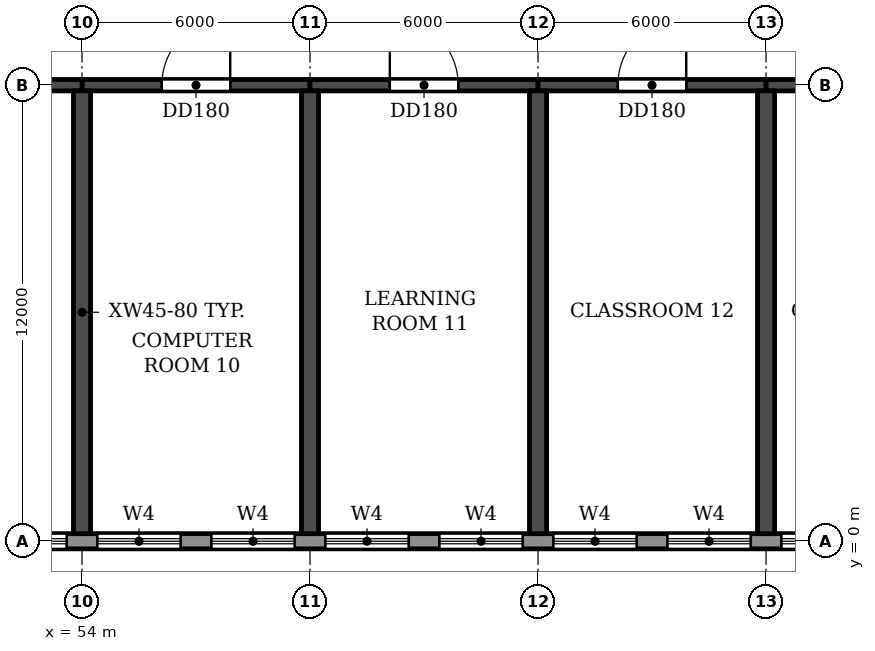
"""IFC4 building model, lengths in metres.
Left out: names, types, materials, properties, quantities, classifications, styles, units other than length and angle.
Written with IfcOpenShell. Run it as: python <this file> out.ifc"""

import sys

from ifc_helpers import new_model, si_unit, direction, frame, frame_2d, origin, place, context, subcontext, project, spatial, rectangle, extrude, element, fill, save


model = new_model("IFC4")
c1 = context("Model", 3, precision=1e-05, world=origin(), true_north=direction((0.0, 1.0)))
c2 = subcontext(c1, "Body", "Model", "MODEL_VIEW")
j1 = project(units=[si_unit("LENGTHUNIT", "METRE"), si_unit("PLANEANGLEUNIT", "RADIAN")], contexts=[c1])
p1 = place(None, origin())
s1 = spatial("IfcSite", under=j1, at=p1, CompositionType="ELEMENT")
p2 = place(p1, origin())
s2 = spatial("IfcBuilding", under=s1, at=p2, CompositionType="ELEMENT")
p3 = place(p2, frame((0.0, 0.0, 15.0)))
s3 = spatial("IfcBuildingStorey", under=s2, at=p3, CompositionType="ELEMENT", Elevation=15.0)
for number, where, z_axis, x_axis in (
    (1, (54.0, 0.2, 0.0), (0.0, 0.0, 1.0), (0.0, 1.0, 0.0)),
    (2, (60.0, 0.2, 0.0), (0.0, 0.0, 1.0), (0.0, 1.0, 0.0)),
    (3, (66.0, 0.2, 0.0), (0.0, 0.0, 1.0), (0.0, 1.0, 0.0)),
    (4, (72.0, 0.2, 0.0), (0.0, 0.0, 1.0), (0.0, 1.0, 0.0)),
):
    element("IfcWall", number, at=place(p3, frame(where, z_axis=z_axis, x_axis=x_axis)), inside=s3, PredefinedType="SHEAR", context=c2, shape_type="SweptSolid", body=[
        extrude(rectangle(XDim=11.65, YDim=0.45, at=frame_2d((5.825, 0.0))), origin(), (0.0, 0.0, 1.0), 3.92),
    ])
p4 = place(p3, frame((48.0, 12.0, 0.0), z_axis=(0.0, 0.0, 1.0), x_axis=(1.0, 0.0, 0.0)))
e5 = element("IfcWall", 5, at=p4, inside=s3, PredefinedType="SHEAR", context=c2, shape_type="SweptSolid", body=[
    extrude(rectangle(XDim=6.0, YDim=0.3, at=frame_2d((3.0, 0.0))), origin(), (0.0, 0.0, 1.0), 3.32),
])
p5 = place(p4, frame((2.1, 0.0, 0.0)))
e6 = element("IfcOpeningElement", 6, at=p5, cuts=e5, PredefinedType="OPENING", context=c2, shape_type="SweptSolid", body=[
    extrude(rectangle(XDim=1.8, YDim=2.1, at=frame_2d((0.9, 1.05))), frame((0.0, 0.16, 0.0), z_axis=(0.0, -1.0, 0.0), x_axis=(1.0, 0.0, 0.0)), (0.0, 0.0, 1.0), 0.32),
])
p6 = place(p3, frame((54.0, 12.0, 0.0), z_axis=(0.0, 0.0, 1.0), x_axis=(1.0, 0.0, 0.0)))
e7 = element("IfcWall", 7, at=p6, inside=s3, PredefinedType="SHEAR", context=c2, shape_type="SweptSolid", body=[
    extrude(rectangle(XDim=6.0, YDim=0.3, at=frame_2d((3.0, 0.0))), origin(), (0.0, 0.0, 1.0), 3.32),
])
p7 = place(p6, frame((2.1, 0.0, 0.0)))
e8 = element("IfcOpeningElement", 8, at=p7, cuts=e7, PredefinedType="OPENING", context=c2, shape_type="SweptSolid", body=[
    extrude(rectangle(XDim=1.8, YDim=2.1, at=frame_2d((0.9, 1.05))), frame((0.0, 0.16, 0.0), z_axis=(0.0, -1.0, 0.0), x_axis=(1.0, 0.0, 0.0)), (0.0, 0.0, 1.0), 0.32),
])
p8 = place(p3, frame((60.0, 12.0, 0.0), z_axis=(0.0, 0.0, 1.0), x_axis=(1.0, 0.0, 0.0)))
e9 = element("IfcWall", 9, at=p8, inside=s3, PredefinedType="SHEAR", context=c2, shape_type="SweptSolid", body=[
    extrude(rectangle(XDim=6.0, YDim=0.3, at=frame_2d((3.0, 0.0))), origin(), (0.0, 0.0, 1.0), 3.32),
])
p9 = place(p8, frame((2.1, 0.0, 0.0)))
e10 = element("IfcOpeningElement", 10, at=p9, cuts=e9, PredefinedType="OPENING", context=c2, shape_type="SweptSolid", body=[
    extrude(rectangle(XDim=1.8, YDim=2.1, at=frame_2d((0.9, 1.05))), frame((0.0, 0.16, 0.0), z_axis=(0.0, -1.0, 0.0), x_axis=(1.0, 0.0, 0.0)), (0.0, 0.0, 1.0), 0.32),
])
p10 = place(p3, frame((66.0, 12.0, 0.0), z_axis=(0.0, 0.0, 1.0), x_axis=(1.0, 0.0, 0.0)))
e11 = element("IfcWall", 11, at=p10, inside=s3, PredefinedType="SHEAR", context=c2, shape_type="SweptSolid", body=[
    extrude(rectangle(XDim=6.0, YDim=0.3, at=frame_2d((3.0, 0.0))), origin(), (0.0, 0.0, 1.0), 3.32),
])
p11 = place(p10, frame((2.1, 0.0, 0.0)))
e12 = element("IfcOpeningElement", 12, at=p11, cuts=e11, PredefinedType="OPENING", context=c2, shape_type="SweptSolid", body=[
    extrude(rectangle(XDim=1.8, YDim=2.1, at=frame_2d((0.9, 1.05))), frame((0.0, 0.16, 0.0), z_axis=(0.0, -1.0, 0.0), x_axis=(1.0, 0.0, 0.0)), (0.0, 0.0, 1.0), 0.32),
])
p12 = place(p3, frame((72.0, 12.0, 0.0), z_axis=(0.0, 0.0, 1.0), x_axis=(1.0, 0.0, 0.0)))
e13 = element("IfcWall", 13, at=p12, inside=s3, PredefinedType="SHEAR", context=c2, shape_type="SweptSolid", body=[
    extrude(rectangle(XDim=6.0, YDim=0.3, at=frame_2d((3.0, 0.0))), origin(), (0.0, 0.0, 1.0), 3.32),
])
p13 = place(p12, frame((2.1, 0.0, 0.0)))
e14 = element("IfcOpeningElement", 14, at=p13, cuts=e13, PredefinedType="OPENING", context=c2, shape_type="SweptSolid", body=[
    extrude(rectangle(XDim=1.8, YDim=2.1, at=frame_2d((0.9, 1.05))), frame((0.0, 0.16, 0.0), z_axis=(0.0, -1.0, 0.0), x_axis=(1.0, 0.0, 0.0)), (0.0, 0.0, 1.0), 0.32),
])
p14 = place(p3, frame((-3.0, 0.0, 0.0), z_axis=(0.0, 0.0, 1.0), x_axis=(1.0, 0.0, 0.0)))
e15 = element("IfcWall", 15, at=p14, inside=s3, PredefinedType="STANDARD", context=c2, shape_type="SweptSolid", body=[
    extrude(rectangle(XDim=108.0, YDim=0.4, at=frame_2d((54.0, 0.0))), origin(), (0.0, 0.0, 1.0), 3.92),
])
p15 = place(p14, frame((3.4, 0.0, 0.9)))
e16 = element("IfcOpeningElement", 16, at=p15, cuts=e15, PredefinedType="OPENING", context=c2, shape_type="SweptSolid", body=[
    extrude(rectangle(XDim=2.2, YDim=2.7, at=frame_2d((1.1, 1.35))), frame((0.0, 0.21, 0.0), z_axis=(0.0, -1.0, 0.0), x_axis=(1.0, 0.0, 0.0)), (0.0, 0.0, 1.0), 0.42),
])
p16 = place(p14, frame((6.4, 0.0, 0.9)))
e17 = element("IfcOpeningElement", 17, at=p16, cuts=e15, PredefinedType="OPENING", context=c2, shape_type="SweptSolid", body=[
    extrude(rectangle(XDim=2.2, YDim=2.7, at=frame_2d((1.1, 1.35))), frame((0.0, 0.21, 0.0), z_axis=(0.0, -1.0, 0.0), x_axis=(1.0, 0.0, 0.0)), (0.0, 0.0, 1.0), 0.42),
])
p17 = place(p14, frame((9.4, 0.0, 0.9)))
e18 = element("IfcOpeningElement", 18, at=p17, cuts=e15, PredefinedType="OPENING", context=c2, shape_type="SweptSolid", body=[
    extrude(rectangle(XDim=2.2, YDim=2.7, at=frame_2d((1.1, 1.35))), frame((0.0, 0.21, 0.0), z_axis=(0.0, -1.0, 0.0), x_axis=(1.0, 0.0, 0.0)), (0.0, 0.0, 1.0), 0.42),
])
p18 = place(p14, frame((12.4, 0.0, 0.9)))
e19 = element("IfcOpeningElement", 19, at=p18, cuts=e15, PredefinedType="OPENING", context=c2, shape_type="SweptSolid", body=[
    extrude(rectangle(XDim=2.2, YDim=2.7, at=frame_2d((1.1, 1.35))), frame((0.0, 0.21, 0.0), z_axis=(0.0, -1.0, 0.0), x_axis=(1.0, 0.0, 0.0)), (0.0, 0.0, 1.0), 0.42),
])
p19 = place(p14, frame((15.4, 0.0, 0.9)))
e20 = element("IfcOpeningElement", 20, at=p19, cuts=e15, PredefinedType="OPENING", context=c2, shape_type="SweptSolid", body=[
    extrude(rectangle(XDim=2.2, YDim=2.7, at=frame_2d((1.1, 1.35))), frame((0.0, 0.21, 0.0), z_axis=(0.0, -1.0, 0.0), x_axis=(1.0, 0.0, 0.0)), (0.0, 0.0, 1.0), 0.42),
])
p20 = place(p14, frame((18.4, 0.0, 0.9)))
e21 = element("IfcOpeningElement", 21, at=p20, cuts=e15, PredefinedType="OPENING", context=c2, shape_type="SweptSolid", body=[
    extrude(rectangle(XDim=2.2, YDim=2.7, at=frame_2d((1.1, 1.35))), frame((0.0, 0.21, 0.0), z_axis=(0.0, -1.0, 0.0), x_axis=(1.0, 0.0, 0.0)), (0.0, 0.0, 1.0), 0.42),
])
p21 = place(p14, frame((21.4, 0.0, 0.9)))
e22 = element("IfcOpeningElement", 22, at=p21, cuts=e15, PredefinedType="OPENING", context=c2, shape_type="SweptSolid", body=[
    extrude(rectangle(XDim=2.2, YDim=2.7, at=frame_2d((1.1, 1.35))), frame((0.0, 0.21, 0.0), z_axis=(0.0, -1.0, 0.0), x_axis=(1.0, 0.0, 0.0)), (0.0, 0.0, 1.0), 0.42),
])
p22 = place(p14, frame((24.4, 0.0, 0.9)))
e23 = element("IfcOpeningElement", 23, at=p22, cuts=e15, PredefinedType="OPENING", context=c2, shape_type="SweptSolid", body=[
    extrude(rectangle(XDim=2.2, YDim=2.7, at=frame_2d((1.1, 1.35))), frame((0.0, 0.21, 0.0), z_axis=(0.0, -1.0, 0.0), x_axis=(1.0, 0.0, 0.0)), (0.0, 0.0, 1.0), 0.42),
])
p23 = place(p14, frame((27.4, 0.0, 0.9)))
e24 = element("IfcOpeningElement", 24, at=p23, cuts=e15, PredefinedType="OPENING", context=c2, shape_type="SweptSolid", body=[
    extrude(rectangle(XDim=2.2, YDim=2.7, at=frame_2d((1.1, 1.35))), frame((0.0, 0.21, 0.0), z_axis=(0.0, -1.0, 0.0), x_axis=(1.0, 0.0, 0.0)), (0.0, 0.0, 1.0), 0.42),
])
p24 = place(p14, frame((30.4, 0.0, 0.9)))
e25 = element("IfcOpeningElement", 25, at=p24, cuts=e15, PredefinedType="OPENING", context=c2, shape_type="SweptSolid", body=[
    extrude(rectangle(XDim=2.2, YDim=2.7, at=frame_2d((1.1, 1.35))), frame((0.0, 0.21, 0.0), z_axis=(0.0, -1.0, 0.0), x_axis=(1.0, 0.0, 0.0)), (0.0, 0.0, 1.0), 0.42),
])
p25 = place(p14, frame((33.4, 0.0, 0.9)))
e26 = element("IfcOpeningElement", 26, at=p25, cuts=e15, PredefinedType="OPENING", context=c2, shape_type="SweptSolid", body=[
    extrude(rectangle(XDim=2.2, YDim=2.7, at=frame_2d((1.1, 1.35))), frame((0.0, 0.21, 0.0), z_axis=(0.0, -1.0, 0.0), x_axis=(1.0, 0.0, 0.0)), (0.0, 0.0, 1.0), 0.42),
])
p26 = place(p14, frame((36.4, 0.0, 0.9)))
e27 = element("IfcOpeningElement", 27, at=p26, cuts=e15, PredefinedType="OPENING", context=c2, shape_type="SweptSolid", body=[
    extrude(rectangle(XDim=2.2, YDim=2.7, at=frame_2d((1.1, 1.35))), frame((0.0, 0.21, 0.0), z_axis=(0.0, -1.0, 0.0), x_axis=(1.0, 0.0, 0.0)), (0.0, 0.0, 1.0), 0.42),
])
p27 = place(p14, frame((39.4, 0.0, 0.9)))
e28 = element("IfcOpeningElement", 28, at=p27, cuts=e15, PredefinedType="OPENING", context=c2, shape_type="SweptSolid", body=[
    extrude(rectangle(XDim=2.2, YDim=2.7, at=frame_2d((1.1, 1.35))), frame((0.0, 0.21, 0.0), z_axis=(0.0, -1.0, 0.0), x_axis=(1.0, 0.0, 0.0)), (0.0, 0.0, 1.0), 0.42),
])
p28 = place(p14, frame((42.4, 0.0, 0.9)))
e29 = element("IfcOpeningElement", 29, at=p28, cuts=e15, PredefinedType="OPENING", context=c2, shape_type="SweptSolid", body=[
    extrude(rectangle(XDim=2.2, YDim=2.7, at=frame_2d((1.1, 1.35))), frame((0.0, 0.21, 0.0), z_axis=(0.0, -1.0, 0.0), x_axis=(1.0, 0.0, 0.0)), (0.0, 0.0, 1.0), 0.42),
])
p29 = place(p14, frame((45.4, 0.0, 0.9)))
e30 = element("IfcOpeningElement", 30, at=p29, cuts=e15, PredefinedType="OPENING", context=c2, shape_type="SweptSolid", body=[
    extrude(rectangle(XDim=2.2, YDim=2.7, at=frame_2d((1.1, 1.35))), frame((0.0, 0.21, 0.0), z_axis=(0.0, -1.0, 0.0), x_axis=(1.0, 0.0, 0.0)), (0.0, 0.0, 1.0), 0.42),
])
p30 = place(p14, frame((48.4, 0.0, 0.9)))
e31 = element("IfcOpeningElement", 31, at=p30, cuts=e15, PredefinedType="OPENING", context=c2, shape_type="SweptSolid", body=[
    extrude(rectangle(XDim=2.2, YDim=2.7, at=frame_2d((1.1, 1.35))), frame((0.0, 0.21, 0.0), z_axis=(0.0, -1.0, 0.0), x_axis=(1.0, 0.0, 0.0)), (0.0, 0.0, 1.0), 0.42),
])
p31 = place(p14, frame((51.4, 0.0, 0.9)))
e32 = element("IfcOpeningElement", 32, at=p31, cuts=e15, PredefinedType="OPENING", context=c2, shape_type="SweptSolid", body=[
    extrude(rectangle(XDim=2.2, YDim=2.7, at=frame_2d((1.1, 1.35))), frame((0.0, 0.21, 0.0), z_axis=(0.0, -1.0, 0.0), x_axis=(1.0, 0.0, 0.0)), (0.0, 0.0, 1.0), 0.42),
])
p32 = place(p14, frame((54.4, 0.0, 0.9)))
e33 = element("IfcOpeningElement", 33, at=p32, cuts=e15, PredefinedType="OPENING", context=c2, shape_type="SweptSolid", body=[
    extrude(rectangle(XDim=2.2, YDim=2.7, at=frame_2d((1.1, 1.35))), frame((0.0, 0.21, 0.0), z_axis=(0.0, -1.0, 0.0), x_axis=(1.0, 0.0, 0.0)), (0.0, 0.0, 1.0), 0.42),
])
p33 = place(p14, frame((57.4, 0.0, 0.9)))
e34 = element("IfcOpeningElement", 34, at=p33, cuts=e15, PredefinedType="OPENING", context=c2, shape_type="SweptSolid", body=[
    extrude(rectangle(XDim=2.2, YDim=2.7, at=frame_2d((1.1, 1.35))), frame((0.0, 0.21, 0.0), z_axis=(0.0, -1.0, 0.0), x_axis=(1.0, 0.0, 0.0)), (0.0, 0.0, 1.0), 0.42),
])
p34 = place(p14, frame((60.4, 0.0, 0.9)))
e35 = element("IfcOpeningElement", 35, at=p34, cuts=e15, PredefinedType="OPENING", context=c2, shape_type="SweptSolid", body=[
    extrude(rectangle(XDim=2.2, YDim=2.7, at=frame_2d((1.1, 1.35))), frame((0.0, 0.21, 0.0), z_axis=(0.0, -1.0, 0.0), x_axis=(1.0, 0.0, 0.0)), (0.0, 0.0, 1.0), 0.42),
])
p35 = place(p14, frame((63.4, 0.0, 0.9)))
e36 = element("IfcOpeningElement", 36, at=p35, cuts=e15, PredefinedType="OPENING", context=c2, shape_type="SweptSolid", body=[
    extrude(rectangle(XDim=2.2, YDim=2.7, at=frame_2d((1.1, 1.35))), frame((0.0, 0.21, 0.0), z_axis=(0.0, -1.0, 0.0), x_axis=(1.0, 0.0, 0.0)), (0.0, 0.0, 1.0), 0.42),
])
p36 = place(p14, frame((66.4, 0.0, 0.9)))
e37 = element("IfcOpeningElement", 37, at=p36, cuts=e15, PredefinedType="OPENING", context=c2, shape_type="SweptSolid", body=[
    extrude(rectangle(XDim=2.2, YDim=2.7, at=frame_2d((1.1, 1.35))), frame((0.0, 0.21, 0.0), z_axis=(0.0, -1.0, 0.0), x_axis=(1.0, 0.0, 0.0)), (0.0, 0.0, 1.0), 0.42),
])
p37 = place(p14, frame((69.4, 0.0, 0.9)))
e38 = element("IfcOpeningElement", 38, at=p37, cuts=e15, PredefinedType="OPENING", context=c2, shape_type="SweptSolid", body=[
    extrude(rectangle(XDim=2.2, YDim=2.7, at=frame_2d((1.1, 1.35))), frame((0.0, 0.21, 0.0), z_axis=(0.0, -1.0, 0.0), x_axis=(1.0, 0.0, 0.0)), (0.0, 0.0, 1.0), 0.42),
])
p38 = place(p14, frame((72.4, 0.0, 0.9)))
e39 = element("IfcOpeningElement", 39, at=p38, cuts=e15, PredefinedType="OPENING", context=c2, shape_type="SweptSolid", body=[
    extrude(rectangle(XDim=2.2, YDim=2.7, at=frame_2d((1.1, 1.35))), frame((0.0, 0.21, 0.0), z_axis=(0.0, -1.0, 0.0), x_axis=(1.0, 0.0, 0.0)), (0.0, 0.0, 1.0), 0.42),
])
p39 = place(p14, frame((75.4, 0.0, 0.9)))
e40 = element("IfcOpeningElement", 40, at=p39, cuts=e15, PredefinedType="OPENING", context=c2, shape_type="SweptSolid", body=[
    extrude(rectangle(XDim=2.2, YDim=2.7, at=frame_2d((1.1, 1.35))), frame((0.0, 0.21, 0.0), z_axis=(0.0, -1.0, 0.0), x_axis=(1.0, 0.0, 0.0)), (0.0, 0.0, 1.0), 0.42),
])
p40 = place(p14, frame((78.4, 0.0, 0.9)))
e41 = element("IfcOpeningElement", 41, at=p40, cuts=e15, PredefinedType="OPENING", context=c2, shape_type="SweptSolid", body=[
    extrude(rectangle(XDim=2.2, YDim=2.7, at=frame_2d((1.1, 1.35))), frame((0.0, 0.21, 0.0), z_axis=(0.0, -1.0, 0.0), x_axis=(1.0, 0.0, 0.0)), (0.0, 0.0, 1.0), 0.42),
])
p41 = place(p14, frame((81.4, 0.0, 0.9)))
e42 = element("IfcOpeningElement", 42, at=p41, cuts=e15, PredefinedType="OPENING", context=c2, shape_type="SweptSolid", body=[
    extrude(rectangle(XDim=2.2, YDim=2.7, at=frame_2d((1.1, 1.35))), frame((0.0, 0.21, 0.0), z_axis=(0.0, -1.0, 0.0), x_axis=(1.0, 0.0, 0.0)), (0.0, 0.0, 1.0), 0.42),
])
p42 = place(p14, frame((84.4, 0.0, 0.9)))
e43 = element("IfcOpeningElement", 43, at=p42, cuts=e15, PredefinedType="OPENING", context=c2, shape_type="SweptSolid", body=[
    extrude(rectangle(XDim=2.2, YDim=2.7, at=frame_2d((1.1, 1.35))), frame((0.0, 0.21, 0.0), z_axis=(0.0, -1.0, 0.0), x_axis=(1.0, 0.0, 0.0)), (0.0, 0.0, 1.0), 0.42),
])
p43 = place(p14, frame((87.4, 0.0, 0.9)))
e44 = element("IfcOpeningElement", 44, at=p43, cuts=e15, PredefinedType="OPENING", context=c2, shape_type="SweptSolid", body=[
    extrude(rectangle(XDim=2.2, YDim=2.7, at=frame_2d((1.1, 1.35))), frame((0.0, 0.21, 0.0), z_axis=(0.0, -1.0, 0.0), x_axis=(1.0, 0.0, 0.0)), (0.0, 0.0, 1.0), 0.42),
])
p44 = place(p14, frame((90.4, 0.0, 0.9)))
e45 = element("IfcOpeningElement", 45, at=p44, cuts=e15, PredefinedType="OPENING", context=c2, shape_type="SweptSolid", body=[
    extrude(rectangle(XDim=2.2, YDim=2.7, at=frame_2d((1.1, 1.35))), frame((0.0, 0.21, 0.0), z_axis=(0.0, -1.0, 0.0), x_axis=(1.0, 0.0, 0.0)), (0.0, 0.0, 1.0), 0.42),
])
p45 = place(p14, frame((93.4, 0.0, 0.9)))
e46 = element("IfcOpeningElement", 46, at=p45, cuts=e15, PredefinedType="OPENING", context=c2, shape_type="SweptSolid", body=[
    extrude(rectangle(XDim=2.2, YDim=2.7, at=frame_2d((1.1, 1.35))), frame((0.0, 0.21, 0.0), z_axis=(0.0, -1.0, 0.0), x_axis=(1.0, 0.0, 0.0)), (0.0, 0.0, 1.0), 0.42),
])
p46 = place(p14, frame((96.4, 0.0, 0.9)))
e47 = element("IfcOpeningElement", 47, at=p46, cuts=e15, PredefinedType="OPENING", context=c2, shape_type="SweptSolid", body=[
    extrude(rectangle(XDim=2.2, YDim=2.7, at=frame_2d((1.1, 1.35))), frame((0.0, 0.21, 0.0), z_axis=(0.0, -1.0, 0.0), x_axis=(1.0, 0.0, 0.0)), (0.0, 0.0, 1.0), 0.42),
])
p47 = place(p14, frame((99.4, 0.0, 0.9)))
e48 = element("IfcOpeningElement", 48, at=p47, cuts=e15, PredefinedType="OPENING", context=c2, shape_type="SweptSolid", body=[
    extrude(rectangle(XDim=2.2, YDim=2.7, at=frame_2d((1.1, 1.35))), frame((0.0, 0.21, 0.0), z_axis=(0.0, -1.0, 0.0), x_axis=(1.0, 0.0, 0.0)), (0.0, 0.0, 1.0), 0.42),
])
p48 = place(p14, frame((102.4, 0.0, 0.9)))
e49 = element("IfcOpeningElement", 49, at=p48, cuts=e15, PredefinedType="OPENING", context=c2, shape_type="SweptSolid", body=[
    extrude(rectangle(XDim=2.2, YDim=2.7, at=frame_2d((1.1, 1.35))), frame((0.0, 0.21, 0.0), z_axis=(0.0, -1.0, 0.0), x_axis=(1.0, 0.0, 0.0)), (0.0, 0.0, 1.0), 0.42),
])
p49 = place(p32, origin())
e50 = element("IfcWindow", 50, at=p49, inside=s3, PartitioningType="DOUBLE_PANEL_HORIZONTAL", PredefinedType="WINDOW", context=c2, shape_type="SweptSolid", body=[
    extrude(rectangle(XDim=2.2, YDim=2.7, at=frame_2d((1.1, 1.35))), frame((0.0, 0.03, 0.0), z_axis=(0.0, -1.0, 0.0), x_axis=(1.0, 0.0, 0.0)), (0.0, 0.0, 1.0), 0.06),
])
fill(e33, e50)
p50 = place(p33, origin())
e51 = element("IfcWindow", 51, at=p50, inside=s3, PartitioningType="DOUBLE_PANEL_HORIZONTAL", PredefinedType="WINDOW", context=c2, shape_type="SweptSolid", body=[
    extrude(rectangle(XDim=2.2, YDim=2.7, at=frame_2d((1.1, 1.35))), frame((0.0, 0.03, 0.0), z_axis=(0.0, -1.0, 0.0), x_axis=(1.0, 0.0, 0.0)), (0.0, 0.0, 1.0), 0.06),
])
fill(e34, e51)
p51 = place(p34, origin())
e52 = element("IfcWindow", 52, at=p51, inside=s3, PartitioningType="DOUBLE_PANEL_HORIZONTAL", PredefinedType="WINDOW", context=c2, shape_type="SweptSolid", body=[
    extrude(rectangle(XDim=2.2, YDim=2.7, at=frame_2d((1.1, 1.35))), frame((0.0, 0.03, 0.0), z_axis=(0.0, -1.0, 0.0), x_axis=(1.0, 0.0, 0.0)), (0.0, 0.0, 1.0), 0.06),
])
fill(e35, e52)
p52 = place(p35, origin())
e53 = element("IfcWindow", 53, at=p52, inside=s3, PartitioningType="DOUBLE_PANEL_HORIZONTAL", PredefinedType="WINDOW", context=c2, shape_type="SweptSolid", body=[
    extrude(rectangle(XDim=2.2, YDim=2.7, at=frame_2d((1.1, 1.35))), frame((0.0, 0.03, 0.0), z_axis=(0.0, -1.0, 0.0), x_axis=(1.0, 0.0, 0.0)), (0.0, 0.0, 1.0), 0.06),
])
fill(e36, e53)
p53 = place(p36, origin())
e54 = element("IfcWindow", 54, at=p53, inside=s3, PartitioningType="DOUBLE_PANEL_HORIZONTAL", PredefinedType="WINDOW", context=c2, shape_type="SweptSolid", body=[
    extrude(rectangle(XDim=2.2, YDim=2.7, at=frame_2d((1.1, 1.35))), frame((0.0, 0.03, 0.0), z_axis=(0.0, -1.0, 0.0), x_axis=(1.0, 0.0, 0.0)), (0.0, 0.0, 1.0), 0.06),
])
fill(e37, e54)
p54 = place(p37, origin())
e55 = element("IfcWindow", 55, at=p54, inside=s3, PartitioningType="DOUBLE_PANEL_HORIZONTAL", PredefinedType="WINDOW", context=c2, shape_type="SweptSolid", body=[
    extrude(rectangle(XDim=2.2, YDim=2.7, at=frame_2d((1.1, 1.35))), frame((0.0, 0.03, 0.0), z_axis=(0.0, -1.0, 0.0), x_axis=(1.0, 0.0, 0.0)), (0.0, 0.0, 1.0), 0.06),
])
fill(e38, e55)
p55 = place(p38, origin())
e56 = element("IfcWindow", 56, at=p55, inside=s3, PartitioningType="DOUBLE_PANEL_HORIZONTAL", PredefinedType="WINDOW", context=c2, shape_type="SweptSolid", body=[
    extrude(rectangle(XDim=2.2, YDim=2.7, at=frame_2d((1.1, 1.35))), frame((0.0, 0.03, 0.0), z_axis=(0.0, -1.0, 0.0), x_axis=(1.0, 0.0, 0.0)), (0.0, 0.0, 1.0), 0.06),
])
fill(e39, e56)
p56 = place(p39, origin())
e57 = element("IfcWindow", 57, at=p56, inside=s3, PartitioningType="DOUBLE_PANEL_HORIZONTAL", PredefinedType="WINDOW", context=c2, shape_type="SweptSolid", body=[
    extrude(rectangle(XDim=2.2, YDim=2.7, at=frame_2d((1.1, 1.35))), frame((0.0, 0.03, 0.0), z_axis=(0.0, -1.0, 0.0), x_axis=(1.0, 0.0, 0.0)), (0.0, 0.0, 1.0), 0.06),
])
fill(e40, e57)
p57 = place(p7, origin())
e58 = element("IfcDoor", 58, at=p57, inside=s3, OperationType="DOUBLE_DOOR_SINGLE_SWING", PredefinedType="DOOR", context=c2, shape_type="SweptSolid", body=[
    extrude(rectangle(XDim=1.8, YDim=2.1, at=frame_2d((0.9, 1.05))), frame((0.0, 0.025, 0.0), z_axis=(0.0, -1.0, 0.0), x_axis=(1.0, 0.0, 0.0)), (0.0, 0.0, 1.0), 0.05),
])
fill(e8, e58)
p58 = place(p9, origin())
e59 = element("IfcDoor", 59, at=p58, inside=s3, OperationType="DOUBLE_DOOR_SINGLE_SWING", PredefinedType="DOOR", context=c2, shape_type="SweptSolid", body=[
    extrude(rectangle(XDim=1.8, YDim=2.1, at=frame_2d((0.9, 1.05))), frame((0.0, 0.025, 0.0), z_axis=(0.0, -1.0, 0.0), x_axis=(1.0, 0.0, 0.0)), (0.0, 0.0, 1.0), 0.05),
])
fill(e10, e59)
p59 = place(p11, origin())
e60 = element("IfcDoor", 60, at=p59, inside=s3, OperationType="DOUBLE_DOOR_SINGLE_SWING", PredefinedType="DOOR", context=c2, shape_type="SweptSolid", body=[
    extrude(rectangle(XDim=1.8, YDim=2.1, at=frame_2d((0.9, 1.05))), frame((0.0, 0.025, 0.0), z_axis=(0.0, -1.0, 0.0), x_axis=(1.0, 0.0, 0.0)), (0.0, 0.0, 1.0), 0.05),
])
fill(e12, e60)
save(model, sys.argv[1])
